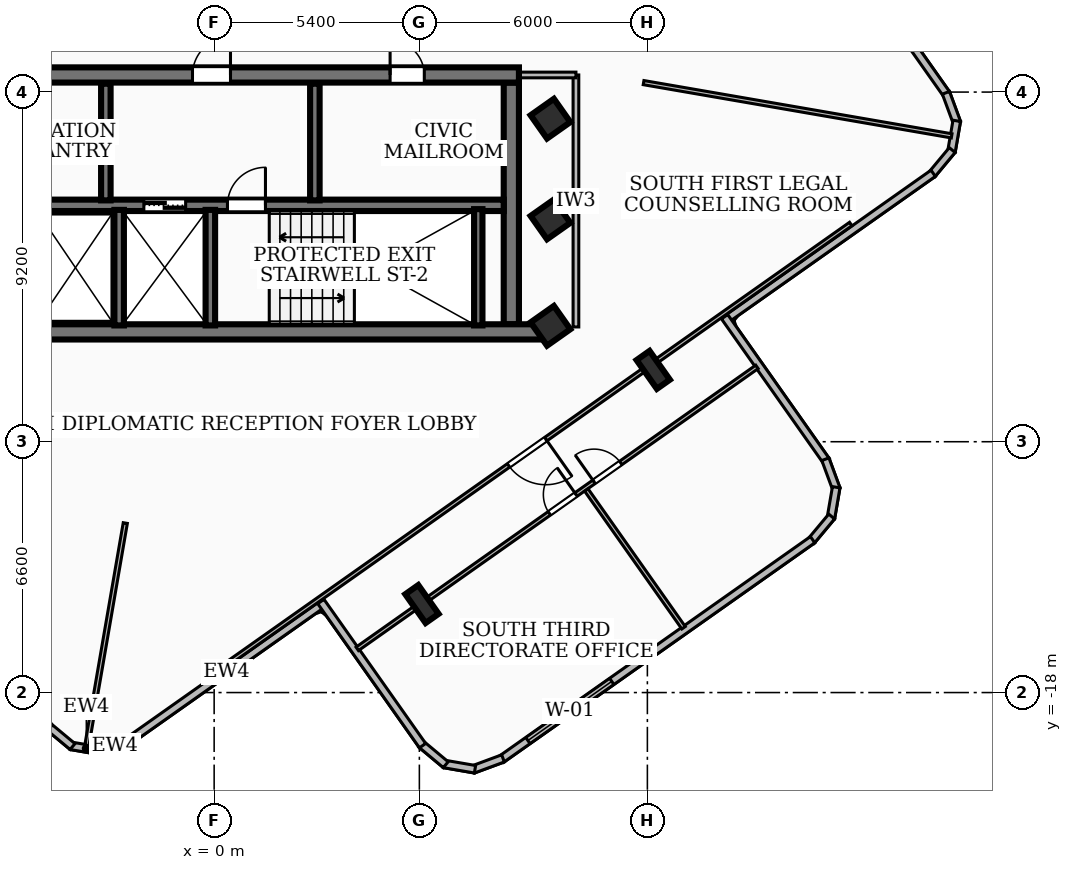
"""IFC4 building model, lengths in metres.
Left out: names, types, materials, properties, quantities, classifications, styles, units other than length and angle.
Written with IfcOpenShell. Run it as: python <this file> out.ifc"""

import sys

from ifc_helpers import new_model, si_unit, direction, frame, frame_2d, origin, origin_2d, place, context, subcontext, project, spatial, rectangle, i_section, extrude, element, fill, save


model = new_model("IFC4")
c1 = context("Model", 3, precision=1e-05, world=origin(), true_north=direction((0.0, 1.0)))
c2 = subcontext(c1, "Body", "Model", "MODEL_VIEW")
j1 = project(units=[si_unit("LENGTHUNIT", "METRE"), si_unit("PLANEANGLEUNIT", "RADIAN")], contexts=[c1])
p1 = place(None, origin())
s1 = spatial("IfcSite", under=j1, at=p1, CompositionType="ELEMENT")
p2 = place(p1, origin())
s2 = spatial("IfcBuilding", under=s1, at=p2, CompositionType="ELEMENT")
p3 = place(p2, frame((0.0, 0.0, 225.72)))
s3 = spatial("IfcBuildingStorey", under=s2, at=p3, CompositionType="ELEMENT", Elevation=225.72)
p4 = place(p3, frame((8.78, -8.51, 0.0), z_axis=(0.0, 0.0, 1.0), x_axis=(-1.0, 0.0, 0.0)))
e1 = element("IfcWall", 1, at=p4, inside=s3, PredefinedType="SHEAR", context=c2, shape_type="SweptSolid", body=[
    extrude(rectangle(XDim=17.56, YDim=0.4, at=frame_2d((8.78, 0.0))), origin(), (0.0, 0.0, 1.0), 3.14),
])
p5 = place(p3, frame((-8.02, -1.75, 0.0), z_axis=(0.0, 0.0, 1.0), x_axis=(1.0, 0.0, 0.0)))
e2 = element("IfcWall", 2, at=p5, inside=s3, PredefinedType="SHEAR", context=c2, shape_type="SweptSolid", body=[
    extrude(rectangle(XDim=16.04, YDim=0.4, at=frame_2d((8.02, 0.0))), origin(), (0.0, 0.0, 1.0), 3.14),
])
p6 = place(p5, frame((7.45, 0.0, 0.0)))
e3 = element("IfcOpeningElement", 3, at=p6, cuts=e2, PredefinedType="OPENING", context=c2, shape_type="SweptSolid", body=[
    extrude(rectangle(XDim=1.0, YDim=2.1, at=frame_2d((0.5, 1.05))), frame((0.0, 0.21, 0.0), z_axis=(0.0, -1.0, 0.0), x_axis=(1.0, 0.0, 0.0)), (0.0, 0.0, 1.0), 0.42),
])
p7 = place(p5, frame((12.65, 0.0, 0.0)))
e4 = element("IfcOpeningElement", 4, at=p7, cuts=e2, PredefinedType="OPENING", context=c2, shape_type="SweptSolid", body=[
    extrude(rectangle(XDim=0.9, YDim=2.06, at=frame_2d((0.45, 1.03))), frame((0.0, 0.21, 0.0), z_axis=(0.0, -1.0, 0.0), x_axis=(1.0, 0.0, 0.0)), (0.0, 0.0, 1.0), 0.42),
])
p8 = place(p5, frame((2.25, 0.0, 0.0)))
e5 = element("IfcOpeningElement", 5, at=p8, cuts=e2, PredefinedType="OPENING", context=c2, shape_type="SweptSolid", body=[
    extrude(rectangle(XDim=0.9, YDim=2.06, at=frame_2d((0.45, 1.03))), frame((0.0, 0.21, 0.0), z_axis=(0.0, -1.0, 0.0), x_axis=(1.0, 0.0, 0.0)), (0.0, 0.0, 1.0), 0.42),
])
p9 = place(p3, frame((7.82, -1.95, 0.0), z_axis=(0.0, 0.0, 1.0), x_axis=(0.0, -1.0, 0.0)))
e6 = element("IfcWall", 6, at=p9, inside=s3, PredefinedType="SHEAR", context=c2, shape_type="SweptSolid", body=[
    extrude(rectangle(XDim=6.36, YDim=0.4, at=frame_2d((3.18, 0.0))), origin(), (0.0, 0.0, 1.0), 3.14),
])
p10 = place(p3, frame((-7.62, -5.18, 0.0), z_axis=(0.0, 0.0, 1.0), x_axis=(1.0, 0.0, 0.0)))
e7 = element("IfcWall", 7, at=p10, inside=s3, PredefinedType="SOLIDWALL", context=c2, shape_type="SweptSolid", body=[
    extrude(rectangle(XDim=15.24, YDim=0.3, at=frame_2d((7.62, 0.0))), origin(), (0.0, 0.0, 1.0), 3.14),
])
p11 = place(p10, frame((5.77, 0.0, 0.0)))
e8 = element("IfcOpeningElement", 8, at=p11, cuts=e7, PredefinedType="OPENING", context=c2, shape_type="SweptSolid", body=[
    extrude(rectangle(XDim=1.1, YDim=2.15, at=frame_2d((0.55, 1.075))), frame((0.0, 0.16, 0.0), z_axis=(0.0, -1.0, 0.0), x_axis=(1.0, 0.0, 0.0)), (0.0, 0.0, 1.0), 0.32),
])
p12 = place(p10, frame((7.97, 0.0, 0.0)))
e9 = element("IfcOpeningElement", 9, at=p12, cuts=e7, PredefinedType="OPENING", context=c2, shape_type="SweptSolid", body=[
    extrude(rectangle(XDim=1.0, YDim=2.1, at=frame_2d((0.5, 1.05))), frame((0.0, 0.16, 0.0), z_axis=(0.0, -1.0, 0.0), x_axis=(1.0, 0.0, 0.0)), (0.0, 0.0, 1.0), 0.32),
])
p13 = place(p3, frame((6.95, -8.34, 0.0), z_axis=(0.0, 0.0, 1.0), x_axis=(0.0, 1.0, 0.0)))
e10 = element("IfcWall", 10, at=p13, inside=s3, PredefinedType="SOLIDWALL", context=c2, shape_type="SweptSolid", body=[
    extrude(rectangle(XDim=3.06, YDim=0.22, at=frame_2d((1.53, 0.0))), origin(), (0.0, 0.0, 1.0), 3.14),
])
for number, where, z_axis, x_axis in (
    (11, (-0.1, -8.34, 0.0), (0.0, 0.0, 1.0), (0.0, 1.0, 0.0)),
    (12, (-2.5, -8.34, 0.0), (0.0, 0.0, 1.0), (0.0, 1.0, 0.0)),
):
    element("IfcWall", number, at=place(p3, frame(where, z_axis=z_axis, x_axis=x_axis)), inside=s3, PredefinedType="SOLIDWALL", context=c2, shape_type="SweptSolid", body=[
        extrude(rectangle(XDim=3.04, YDim=0.25, at=frame_2d((1.52, 0.0))), origin(), (0.0, 0.0, 1.0), 3.14),
    ])
for number, where, z_axis, x_axis in (
    (13, (-2.85, -5.05, 0.0), (0.0, 0.0, 1.0), (0.0, 1.0, 0.0)),
    (14, (2.65, -5.05, 0.0), (0.0, 0.0, 1.0), (0.0, 1.0, 0.0)),
):
    element("IfcWall", number, at=place(p3, frame(where, z_axis=z_axis, x_axis=x_axis)), inside=s3, PredefinedType="SOLIDWALL", context=c2, shape_type="SweptSolid", body=[
        extrude(rectangle(XDim=3.07, YDim=0.25, at=frame_2d((1.535, 0.0))), origin(), (0.0, 0.0, 1.0), 3.14),
    ])
for number, where, z_axis, x_axis in (
    (15, (8.85, -5.55, 0.0), (0.0, 0.0, 1.0), (0.817, 0.576, 0.0)),
    (16, (8.85, -2.9, 0.0), (0.0, 0.0, 1.0), (0.817, 0.576, 0.0)),
    (17, (8.85, -8.35, 0.0), (0.0, 0.0, 1.0), (0.817, 0.576, 0.0)),
):
    element("IfcColumn", number, at=place(p3, frame(where, z_axis=z_axis, x_axis=x_axis)), inside=s3, PredefinedType="COLUMN", context=c2, shape_type="SweptSolid", body=[
        extrude(rectangle(XDim=0.75, YDim=0.75, at=origin_2d()), origin(), (0.0, 0.0, 1.0), 3.42),
    ])
for number, where, z_axis, x_axis in (
    (18, (5.468, -15.671, 0.0), (0.0, 0.0, 1.0), (0.817, 0.576, 0.0)),
    (19, (11.554, -9.51, 0.0), (0.0, 0.0, 1.0), (0.817, 0.576, 0.0)),
):
    element("IfcColumn", number, at=place(p3, frame(where, z_axis=z_axis, x_axis=x_axis)), inside=s3, PredefinedType="COLUMN", context=c2, shape_type="SweptSolid", body=[
        extrude(i_section(OverallWidth=0.418, OverallDepth=0.927, WebThickness=0.019, FlangeThickness=0.032, at=origin_2d()), origin(), (0.0, 0.0, 1.0), 3.42),
    ])
p14 = place(p3, frame((2.919, -15.623, 0.0), z_axis=(0.0, 0.0, 1.0), x_axis=(-0.817050016192, -0.576566796686, 0.0)))
e20 = element("IfcWall", 20, at=p14, inside=s3, PredefinedType="SOLIDWALL", context=c2, shape_type="SweptSolid", body=[
    extrude(rectangle(XDim=6.341, YDim=0.2, at=frame_2d((3.17, 0.0))), origin(), (0.0, 0.0, 1.0), 3.14),
])
p15 = place(p3, frame((-2.219, -19.256, 0.0), z_axis=(0.0, 0.0, 1.0), x_axis=(-0.938243551417, -0.345975487894, 0.0)))
e21 = element("IfcWall", 21, at=p15, inside=s3, PredefinedType="SOLIDWALL", context=c2, shape_type="SweptSolid", body=[
    extrude(rectangle(XDim=0.838, YDim=0.2, at=frame_2d((0.419, 0.0))), origin(), (0.0, 0.0, 1.0), 3.14),
])
p16 = place(p3, frame((-2.957, -19.541, 0.0), z_axis=(0.0, 0.0, 1.0), x_axis=(-0.985466949497, 0.169867275979, 0.0)))
e22 = element("IfcWall", 22, at=p16, inside=s3, PredefinedType="SOLIDWALL", context=c2, shape_type="SweptSolid", body=[
    extrude(rectangle(XDim=0.825, YDim=0.2, at=frame_2d((0.413, 0.0))), origin(), (0.0, 0.0, 1.0), 3.14),
])
p17 = place(p3, frame((-3.726, -19.421, 0.0), z_axis=(0.0, 0.0, 1.0), x_axis=(-0.768698761673, 0.639610986305, 0.0)))
e23 = element("IfcWall", 23, at=p17, inside=s3, PredefinedType="SOLIDWALL", context=c2, shape_type="SweptSolid", body=[
    extrude(rectangle(XDim=0.838, YDim=0.2, at=frame_2d((0.419, 0.0))), origin(), (0.0, 0.0, 1.0), 3.14),
])
p18 = place(p3, frame((-4.337, -18.921, 0.0), z_axis=(0.0, 0.0, 1.0), x_axis=(-0.576413609547, 0.817158094085, 0.0)))
e24 = element("IfcWall", 24, at=p18, inside=s3, PredefinedType="SOLIDWALL", context=c2, shape_type="SweptSolid", body=[
    extrude(rectangle(XDim=25.923, YDim=0.2, at=frame_2d((12.961, 0.0))), origin(), (0.0, 0.0, 1.0), 3.14),
])
p19 = place(p18, frame((19.02, 0.0, 0.85)))
e25 = element("IfcOpeningElement", 25, at=p19, cuts=e24, PredefinedType="OPENING", context=c2, shape_type="SweptSolid", body=[
    extrude(rectangle(XDim=2.4, YDim=1.65, at=frame_2d((1.2, 0.825))), frame((0.0, 0.11, 0.0), z_axis=(0.0, -1.0, 0.0), x_axis=(1.0, 0.0, 0.0)), (0.0, 0.0, 1.0), 0.22),
])
p20 = place(p3, frame((15.623, 2.919, 0.0), z_axis=(0.0, 0.0, 1.0), x_axis=(0.576566796686, -0.817050016192, 0.0)))
e26 = element("IfcWall", 26, at=p20, inside=s3, PredefinedType="SOLIDWALL", context=c2, shape_type="SweptSolid", body=[
    extrude(rectangle(XDim=6.341, YDim=0.2, at=frame_2d((3.17, 0.0))), origin(), (0.0, 0.0, 1.0), 3.14),
])
p21 = place(p3, frame((19.256, -2.219, 0.0), z_axis=(0.0, 0.0, 1.0), x_axis=(0.345975487894, -0.938243551417, 0.0)))
e27 = element("IfcWall", 27, at=p21, inside=s3, PredefinedType="SOLIDWALL", context=c2, shape_type="SweptSolid", body=[
    extrude(rectangle(XDim=0.838, YDim=0.2, at=frame_2d((0.419, 0.0))), origin(), (0.0, 0.0, 1.0), 3.14),
])
p22 = place(p3, frame((19.541, -2.957, 0.0), z_axis=(0.0, 0.0, 1.0), x_axis=(-0.169867275979, -0.985466949497, 0.0)))
e28 = element("IfcWall", 28, at=p22, inside=s3, PredefinedType="SOLIDWALL", context=c2, shape_type="SweptSolid", body=[
    extrude(rectangle(XDim=0.825, YDim=0.2, at=frame_2d((0.413, 0.0))), origin(), (0.0, 0.0, 1.0), 3.14),
])
p23 = place(p3, frame((19.421, -3.726, 0.0), z_axis=(0.0, 0.0, 1.0), x_axis=(-0.639610986305, -0.768698761673, 0.0)))
e29 = element("IfcWall", 29, at=p23, inside=s3, PredefinedType="SOLIDWALL", context=c2, shape_type="SweptSolid", body=[
    extrude(rectangle(XDim=0.838, YDim=0.2, at=frame_2d((0.419, 0.0))), origin(), (0.0, 0.0, 1.0), 3.14),
])
p24 = place(p3, frame((18.921, -4.337, 0.0), z_axis=(0.0, 0.0, 1.0), x_axis=(-0.817167578816, -0.576400163196, 0.0)))
e30 = element("IfcWall", 30, at=p24, inside=s3, PredefinedType="SOLIDWALL", context=c2, shape_type="SweptSolid", body=[
    extrude(rectangle(XDim=6.74, YDim=0.2, at=frame_2d((3.37, 0.0))), origin(), (0.0, 0.0, 1.0), 3.14),
])
p25 = place(p3, frame((13.432, -8.111, 0.0), z_axis=(0.0, 0.0, 1.0), x_axis=(0.576445639344, -0.817135499707, 0.0)))
e31 = element("IfcWall", 31, at=p25, inside=s3, PredefinedType="SOLIDWALL", context=c2, shape_type="SweptSolid", body=[
    extrude(rectangle(XDim=4.641, YDim=0.2, at=frame_2d((2.32, 0.0))), origin(), (0.0, 0.0, 1.0), 3.14),
])
p26 = place(p3, frame((16.084, -11.86, 0.0), z_axis=(0.0, 0.0, 1.0), x_axis=(0.346232030844, -0.938148911857, 0.0)))
e32 = element("IfcWall", 32, at=p26, inside=s3, PredefinedType="SOLIDWALL", context=c2, shape_type="SweptSolid", body=[
    extrude(rectangle(XDim=0.838, YDim=0.2, at=frame_2d((0.419, 0.0))), origin(), (0.0, 0.0, 1.0), 3.14),
])
p27 = place(p3, frame((16.369, -12.598, 0.0), z_axis=(0.0, 0.0, 1.0), x_axis=(-0.169332910212, -0.985558910223, 0.0)))
e33 = element("IfcWall", 33, at=p27, inside=s3, PredefinedType="SOLIDWALL", context=c2, shape_type="SweptSolid", body=[
    extrude(rectangle(XDim=0.826, YDim=0.2, at=frame_2d((0.413, 0.0))), origin(), (0.0, 0.0, 1.0), 3.14),
])
p28 = place(p3, frame((16.249, -13.368, 0.0), z_axis=(0.0, 0.0, 1.0), x_axis=(-0.641043819012, -0.76750428149, 0.0)))
e34 = element("IfcWall", 34, at=p28, inside=s3, PredefinedType="SOLIDWALL", context=c2, shape_type="SweptSolid", body=[
    extrude(rectangle(XDim=0.838, YDim=0.2, at=frame_2d((0.419, 0.0))), origin(), (0.0, 0.0, 1.0), 3.14),
])
p29 = place(p3, frame((15.748, -13.978, 0.0), z_axis=(0.0, 0.0, 1.0), x_axis=(-0.817168991675, -0.576398160168, 0.0)))
e35 = element("IfcWall", 35, at=p29, inside=s3, PredefinedType="SOLIDWALL", context=c2, shape_type="SweptSolid", body=[
    extrude(rectangle(XDim=10.022, YDim=0.2, at=frame_2d((5.011, 0.0))), origin(), (0.0, 0.0, 1.0), 3.14),
])
p30 = place(p29, frame((6.468, 0.0, 0.85)))
e36 = element("IfcOpeningElement", 36, at=p30, cuts=e35, PredefinedType="OPENING", context=c2, shape_type="SweptSolid", body=[
    extrude(rectangle(XDim=2.7, YDim=2.1, at=frame_2d((1.35, 1.05))), frame((0.0, 0.11, 0.0), z_axis=(0.0, -1.0, 0.0), x_axis=(1.0, 0.0, 0.0)), (0.0, 0.0, 1.0), 0.22),
])
p31 = place(p3, frame((7.601, -19.732, 0.0), z_axis=(0.0, 0.0, 1.0), x_axis=(-0.937664324164, -0.347542249504, 0.0)))
e37 = element("IfcWall", 37, at=p31, inside=s3, PredefinedType="SOLIDWALL", context=c2, shape_type="SweptSolid", body=[
    extrude(rectangle(XDim=0.837, YDim=0.2, at=frame_2d((0.419, 0.0))), origin(), (0.0, 0.0, 1.0), 3.14),
])
p32 = place(p3, frame((6.864, -20.018, 0.0), z_axis=(0.0, 0.0, 1.0), x_axis=(-0.985501046628, 0.16966934636, 0.0)))
e38 = element("IfcWall", 38, at=p32, inside=s3, PredefinedType="SOLIDWALL", context=c2, shape_type="SweptSolid", body=[
    extrude(rectangle(XDim=0.826, YDim=0.2, at=frame_2d((0.413, 0.0))), origin(), (0.0, 0.0, 1.0), 3.14),
])
p33 = place(p3, frame((6.094, -19.898, 0.0), z_axis=(0.0, 0.0, 1.0), x_axis=(-0.767647650908, 0.640872127694, 0.0)))
e39 = element("IfcWall", 39, at=p33, inside=s3, PredefinedType="SOLIDWALL", context=c2, shape_type="SweptSolid", body=[
    extrude(rectangle(XDim=0.838, YDim=0.2, at=frame_2d((0.419, 0.0))), origin(), (0.0, 0.0, 1.0), 3.14),
])
p34 = place(p3, frame((5.484, -19.397, 0.0), z_axis=(0.0, 0.0, 1.0), x_axis=(-0.576451897958, 0.817131084551, 0.0)))
e40 = element("IfcWall", 40, at=p34, inside=s3, PredefinedType="SOLIDWALL", context=c2, shape_type="SweptSolid", body=[
    extrude(rectangle(XDim=4.642, YDim=0.2, at=frame_2d((2.321, 0.0))), origin(), (0.0, 0.0, 1.0), 3.14),
])
p35 = place(p3, frame((9.52, -8.38, 0.0), z_axis=(0.0, 0.0, 1.0), x_axis=(0.0, 1.0, 0.0)))
e41 = element("IfcWall", 41, at=p35, inside=s3, PredefinedType="PARTITIONING", context=c2, shape_type="SweptSolid", body=[
    extrude(rectangle(XDim=6.63, YDim=0.15, at=frame_2d((3.315, 0.0))), origin(), (0.0, 0.0, 1.0), 3.14),
])
p36 = place(p3, frame((7.85, -1.75, 0.0), z_axis=(0.0, 0.0, 1.0), x_axis=(1.0, 0.0, 0.0)))
e42 = element("IfcWall", 42, at=p36, inside=s3, PredefinedType="PARTITIONING", context=c2, shape_type="SweptSolid", body=[
    extrude(rectangle(XDim=1.67, YDim=0.15, at=frame_2d((0.835, 0.0))), origin(), (0.0, 0.0, 1.0), 2.37),
])
p37 = place(p3, frame((-2.338, -13.54, 0.0), z_axis=(0.0, 0.0, 1.0), x_axis=(-0.1703339471, -0.9853863945, 0.0)))
e43 = element("IfcWall", 43, at=p37, inside=s3, PredefinedType="PARTITIONING", context=c2, shape_type="SweptSolid", body=[
    extrude(rectangle(XDim=5.954, YDim=0.11, at=frame_2d((2.977, 0.0))), origin(), (0.0, 0.0, 1.0), 3.14),
])
p38 = place(p3, frame((11.3, -1.951, 0.0), z_axis=(0.0, 0.0, 1.0), x_axis=(0.985391330126, -0.170305391905, 0.0)))
e44 = element("IfcWall", 44, at=p38, inside=s3, PredefinedType="PARTITIONING", context=c2, shape_type="SweptSolid", body=[
    extrude(rectangle(XDim=8.227, YDim=0.11, at=frame_2d((4.114, 0.0))), origin(), (0.0, 0.0, 1.0), 3.14),
])
p39 = place(p3, frame((16.752, -5.671, 0.0), z_axis=(0.0, 0.0, 1.0), x_axis=(-0.81715881447, -0.576412588285, 0.0)))
e45 = element("IfcWall", 45, at=p39, inside=s3, PredefinedType="PARTITIONING", context=c2, shape_type="SweptSolid", body=[
    extrude(rectangle(XDim=20.44, YDim=0.11, at=frame_2d((10.22, 0.0))), origin(), (0.0, 0.0, 1.0), 2.51),
])
p40 = place(p39, frame((9.82, 0.0, 0.0)))
e46 = element("IfcOpeningElement", 46, at=p40, cuts=e45, PredefinedType="OPENING", context=c2, shape_type="SweptSolid", body=[
    extrude(rectangle(XDim=1.2, YDim=2.1, at=frame_2d((0.6, 1.05))), frame((0.0, 0.065, 0.0), z_axis=(0.0, -1.0, 0.0), x_axis=(1.0, 0.0, 0.0)), (0.0, 0.0, 1.0), 0.13),
])
p41 = place(p3, frame((9.795, -12.671, 0.0), z_axis=(0.0, 0.0, 1.0), x_axis=(0.576531911777, -0.817074632272, 0.0)))
e47 = element("IfcWall", 47, at=p41, inside=s3, PredefinedType="PARTITIONING", context=c2, shape_type="SweptSolid", body=[
    extrude(rectangle(XDim=4.435, YDim=0.11, at=frame_2d((2.218, 0.0))), origin(), (0.0, 0.0, 1.0), 3.14),
])
p42 = place(p3, frame((3.766, -16.85, 0.0), z_axis=(0.0, 0.0, 1.0), x_axis=(0.817131323803, 0.576451558815, 0.0)))
e48 = element("IfcWall", 48, at=p42, inside=s3, PredefinedType="PARTITIONING", context=c2, shape_type="SweptSolid", body=[
    extrude(rectangle(XDim=12.87, YDim=0.11, at=frame_2d((6.435, 0.0))), origin(), (0.0, 0.0, 1.0), 2.51),
])
p43 = place(p42, frame((6.185, 0.0, 0.0)))
e49 = element("IfcOpeningElement", 49, at=p43, cuts=e48, PredefinedType="OPENING", context=c2, shape_type="SweptSolid", body=[
    extrude(rectangle(XDim=0.86, YDim=2.04, at=frame_2d((0.43, 1.02))), frame((0.0, 0.065, 0.0), z_axis=(0.0, -1.0, 0.0), x_axis=(1.0, 0.0, 0.0)), (0.0, 0.0, 1.0), 0.13),
])
p44 = place(p42, frame((7.625, 0.0, 0.0)))
e50 = element("IfcOpeningElement", 50, at=p44, cuts=e48, PredefinedType="OPENING", context=c2, shape_type="SweptSolid", body=[
    extrude(rectangle(XDim=0.86, YDim=2.04, at=frame_2d((0.43, 1.02))), frame((0.0, 0.065, 0.0), z_axis=(0.0, -1.0, 0.0), x_axis=(1.0, 0.0, 0.0)), (0.0, 0.0, 1.0), 0.13),
])
p45 = place(p30, origin())
e51 = element("IfcWindow", 51, at=p45, inside=s3, PartitioningType="SINGLE_PANEL", PredefinedType="WINDOW", context=c2, shape_type="SweptSolid", body=[
    extrude(rectangle(XDim=2.7, YDim=2.1, at=frame_2d((1.35, 1.05))), frame((0.0, 0.03, 0.0), z_axis=(0.0, -1.0, 0.0), x_axis=(1.0, 0.0, 0.0)), (0.0, 0.0, 1.0), 0.06),
])
fill(e36, e51)
p46 = place(p6, origin())
e52 = element("IfcDoor", 52, at=p46, inside=s3, OperationType="SINGLE_SWING_RIGHT", PredefinedType="DOOR", context=c2, shape_type="SweptSolid", body=[
    extrude(rectangle(XDim=1.0, YDim=2.1, at=frame_2d((0.5, 1.05))), frame((0.0, 0.025, 0.0), z_axis=(0.0, -1.0, 0.0), x_axis=(1.0, 0.0, 0.0)), (0.0, 0.0, 1.0), 0.05),
])
fill(e3, e52)
p47 = place(p11, origin())
e53 = element("IfcDoor", 53, at=p47, inside=s3, OperationType="DOUBLE_DOOR_SLIDING", PredefinedType="DOOR", context=c2, shape_type="SweptSolid", body=[
    extrude(rectangle(XDim=1.1, YDim=2.15, at=frame_2d((0.55, 1.075))), frame((0.0, 0.025, 0.0), z_axis=(0.0, -1.0, 0.0), x_axis=(1.0, 0.0, 0.0)), (0.0, 0.0, 1.0), 0.05),
])
fill(e8, e53)
p48 = place(p12, origin())
e54 = element("IfcDoor", 54, at=p48, inside=s3, OperationType="SINGLE_SWING_RIGHT", PredefinedType="DOOR", context=c2, shape_type="SweptSolid", body=[
    extrude(rectangle(XDim=1.0, YDim=2.1, at=frame_2d((0.5, 1.05))), frame((0.0, 0.025, 0.0), z_axis=(0.0, -1.0, 0.0), x_axis=(1.0, 0.0, 0.0)), (0.0, 0.0, 1.0), 0.05),
])
fill(e9, e54)
p49 = place(p7, origin())
e55 = element("IfcDoor", 55, at=p49, inside=s3, OperationType="SINGLE_SWING_LEFT", PredefinedType="DOOR", context=c2, shape_type="SweptSolid", body=[
    extrude(rectangle(XDim=0.9, YDim=2.06, at=frame_2d((0.45, 1.03))), frame((0.0, 0.025, 0.0), z_axis=(0.0, -1.0, 0.0), x_axis=(1.0, 0.0, 0.0)), (0.0, 0.0, 1.0), 0.05),
])
fill(e4, e55)
p50 = place(p40, origin())
e56 = element("IfcDoor", 56, at=p50, inside=s3, OperationType="SINGLE_SWING_LEFT", PredefinedType="DOOR", context=c2, shape_type="SweptSolid", body=[
    extrude(rectangle(XDim=1.2, YDim=2.1, at=frame_2d((0.6, 1.05))), frame((0.0, 0.025, 0.0), z_axis=(0.0, -1.0, 0.0), x_axis=(1.0, 0.0, 0.0)), (0.0, 0.0, 1.0), 0.05),
])
fill(e46, e56)
p51 = place(p43, origin())
e57 = element("IfcDoor", 57, at=p51, inside=s3, OperationType="SINGLE_SWING_RIGHT", PredefinedType="DOOR", context=c2, shape_type="SweptSolid", body=[
    extrude(rectangle(XDim=0.86, YDim=2.04, at=frame_2d((0.43, 1.02))), frame((0.0, 0.025, 0.0), z_axis=(0.0, -1.0, 0.0), x_axis=(1.0, 0.0, 0.0)), (0.0, 0.0, 1.0), 0.05),
])
fill(e49, e57)
p52 = place(p44, origin())
e58 = element("IfcDoor", 58, at=p52, inside=s3, OperationType="SINGLE_SWING_LEFT", PredefinedType="DOOR", context=c2, shape_type="SweptSolid", body=[
    extrude(rectangle(XDim=0.86, YDim=2.04, at=frame_2d((0.43, 1.02))), frame((0.0, 0.025, 0.0), z_axis=(0.0, -1.0, 0.0), x_axis=(1.0, 0.0, 0.0)), (0.0, 0.0, 1.0), 0.05),
])
fill(e50, e58)
save(model, sys.argv[1])
